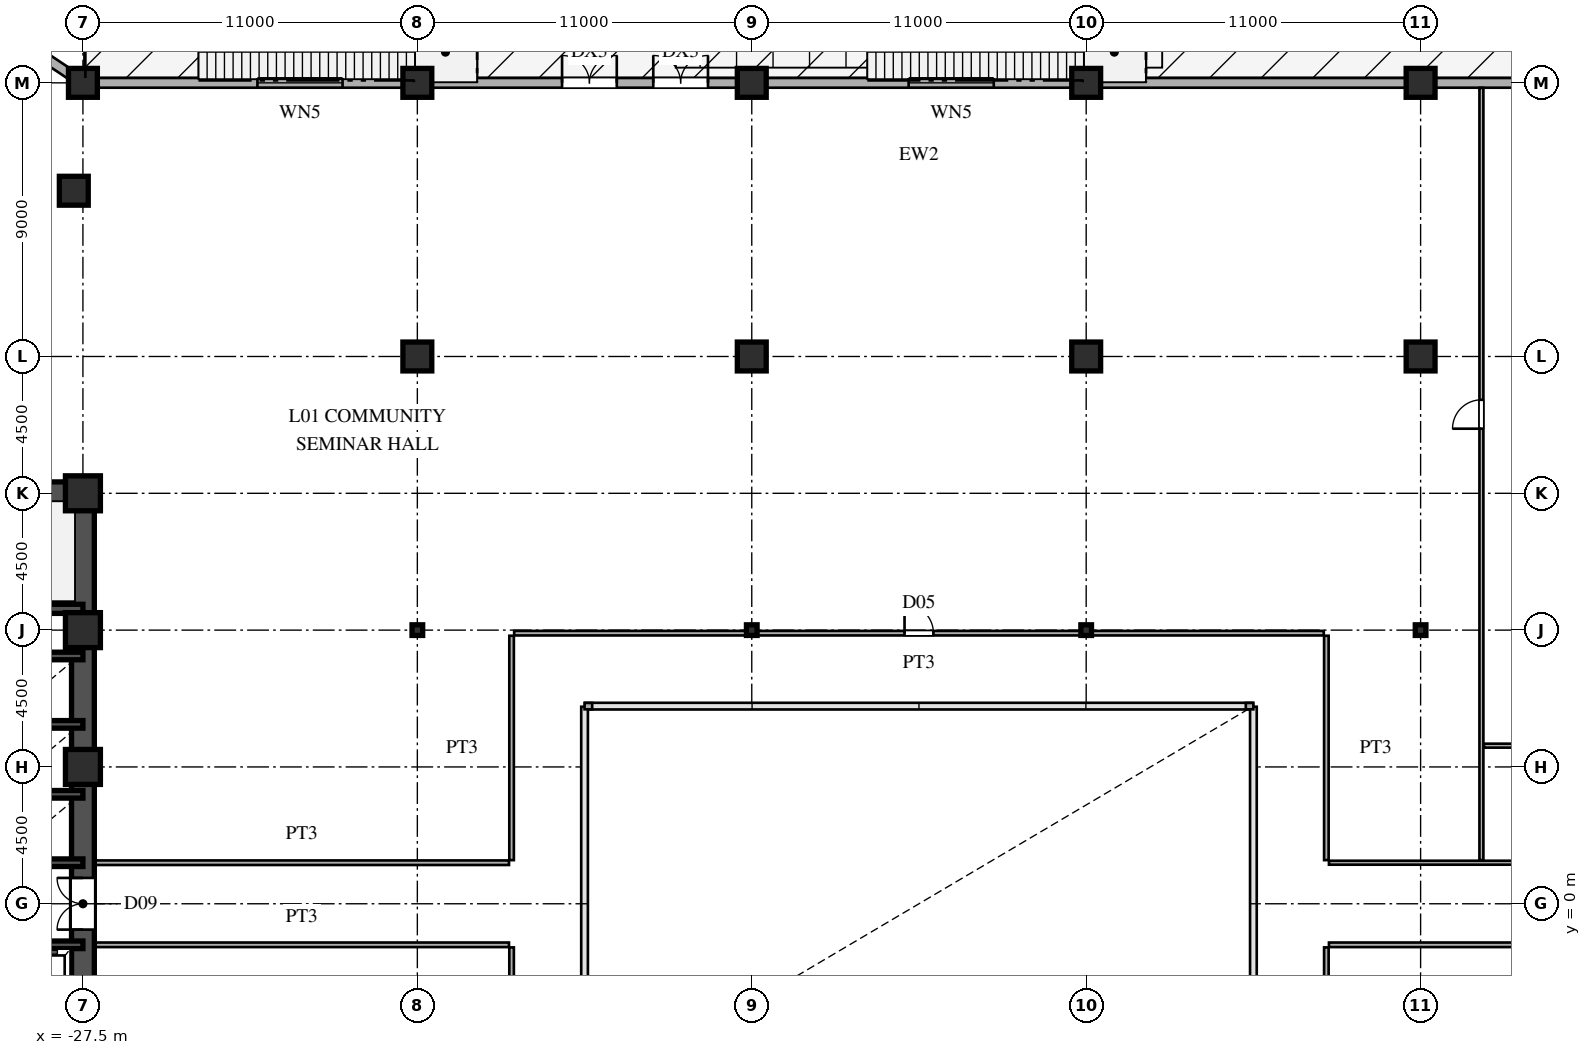
"""IFC4 building model, lengths in metres.
Left out: names, types, materials, properties, quantities, classifications, styles, units other than length and angle.
Written with IfcOpenShell. Run it as: python <this file> out.ifc"""

import sys

from ifc_helpers import new_model, si_unit, direction, frame, frame_2d, origin, origin_2d, place, context, subcontext, project, spatial, rectangle, hollow_rectangle, i_section, extrude, source, transform, mapped, element, fill, save


model = new_model("IFC4")
c1 = context("Model", 3, precision=1e-05, world=origin(), true_north=direction((0.0, 1.0)))
c2 = subcontext(c1, "Body", "Model", "MODEL_VIEW")
j1 = project(units=[si_unit("LENGTHUNIT", "METRE"), si_unit("PLANEANGLEUNIT", "RADIAN")], contexts=[c1])
p1 = place(None, origin())
s1 = spatial("IfcSite", under=j1, at=p1, CompositionType="ELEMENT")
p2 = place(p1, origin())
s2 = spatial("IfcBuilding", under=s1, at=p2, CompositionType="ELEMENT")
p3 = place(p2, frame((0.0, 0.0, 5.4)))
s3 = spatial("IfcBuildingStorey", under=s2, at=p3, CompositionType="ELEMENT", Elevation=5.4)
m1 = source(origin(), c2, "Body", "SweptSolid", [
    extrude(hollow_rectangle(XDim=1.15, YDim=1.15, WallThickness=0.048, at=origin_2d()), origin(), (0.0, 0.0, 1.0), 4.5),
])
for number, where, z_axis, x_axis in (
    (1, (-27.5, 4.5, 0.0), (0.0, 0.0, 1.0), (1.0, 0.0, 0.0)),
    (2, (-27.5, 9.0, 0.0), (0.0, 0.0, 1.0), (1.0, 0.0, 0.0)),
    (3, (-27.5, 13.5, 0.0), (0.0, 0.0, 1.0), (1.0, 0.0, 0.0)),
):
    element("IfcColumn", number, at=place(p3, frame(where, z_axis=z_axis, x_axis=x_axis)), inside=s3, PredefinedType="COLUMN", context=c2, shape_type="MappedRepresentation", body=[
        mapped(m1, transform((0.0, 0.0, 0.0), scale=1.0)),
    ])
m2 = source(origin(), c2, "Body", "SweptSolid", [
    extrude(rectangle(XDim=0.95, YDim=0.95, at=origin_2d()), origin(), (0.0, 0.0, 1.0), 4.5),
])
for number, where, z_axis, x_axis in (
    (4, (-27.5, 27.0, 0.0), (0.0, 0.0, 1.0), (1.0, 0.0, 0.0)),
    (5, (-27.8, 23.451, 0.0), (0.0, 0.0, 1.0), (1.0, 0.0, 0.0)),
):
    element("IfcColumn", number, at=place(p3, frame(where, z_axis=z_axis, x_axis=x_axis)), inside=s3, PredefinedType="COLUMN", context=c2, shape_type="MappedRepresentation", body=[
        mapped(m2, transform((0.0, 0.0, 0.0), scale=1.0)),
    ])
m3 = source(origin(), c2, "Body", "SweptSolid", [
    extrude(i_section(OverallWidth=0.35, OverallDepth=0.35, WebThickness=0.012, FlangeThickness=0.019, at=origin_2d()), origin(), (0.0, 0.0, 1.0), 4.5),
])
p4 = place(p3, frame((-16.5, 9.0, 0.0), z_axis=(0.0, 0.0, 1.0), x_axis=(1.0, 0.0, 0.0)))
e6 = element("IfcColumn", 6, at=p4, inside=s3, PredefinedType="COLUMN", context=c2, shape_type="MappedRepresentation", body=[
    mapped(m3, transform((0.0, 0.0, 0.0), scale=1.0)),
])
for number, where, z_axis, x_axis in (
    (7, (-16.5, 18.0, 0.0), (0.0, 0.0, 1.0), (1.0, 0.0, 0.0)),
    (8, (-16.5, 27.0, 0.0), (0.0, 0.0, 1.0), (1.0, 0.0, 0.0)),
):
    element("IfcColumn", number, at=place(p3, frame(where, z_axis=z_axis, x_axis=x_axis)), inside=s3, PredefinedType="COLUMN", context=c2, shape_type="MappedRepresentation", body=[
        mapped(m2, transform((0.0, 0.0, 0.0), scale=1.0)),
    ])
p5 = place(p3, frame((-5.5, 9.0, 0.0), z_axis=(0.0, 0.0, 1.0), x_axis=(1.0, 0.0, 0.0)))
e9 = element("IfcColumn", 9, at=p5, inside=s3, PredefinedType="COLUMN", context=c2, shape_type="MappedRepresentation", body=[
    mapped(m3, transform((0.0, 0.0, 0.0), scale=1.0)),
])
for number, where, z_axis, x_axis in (
    (10, (-5.5, 18.0, 0.0), (0.0, 0.0, 1.0), (1.0, 0.0, 0.0)),
    (11, (-5.5, 27.0, 0.0), (0.0, 0.0, 1.0), (1.0, 0.0, 0.0)),
):
    element("IfcColumn", number, at=place(p3, frame(where, z_axis=z_axis, x_axis=x_axis)), inside=s3, PredefinedType="COLUMN", context=c2, shape_type="MappedRepresentation", body=[
        mapped(m2, transform((0.0, 0.0, 0.0), scale=1.0)),
    ])
p6 = place(p3, frame((5.5, 9.0, 0.0), z_axis=(0.0, 0.0, 1.0), x_axis=(1.0, 0.0, 0.0)))
e12 = element("IfcColumn", 12, at=p6, inside=s3, PredefinedType="COLUMN", context=c2, shape_type="MappedRepresentation", body=[
    mapped(m3, transform((0.0, 0.0, 0.0), scale=1.0)),
])
for number, where, z_axis, x_axis in (
    (13, (5.5, 18.0, 0.0), (0.0, 0.0, 1.0), (1.0, 0.0, 0.0)),
    (14, (5.5, 27.0, 0.0), (0.0, 0.0, 1.0), (1.0, 0.0, 0.0)),
):
    element("IfcColumn", number, at=place(p3, frame(where, z_axis=z_axis, x_axis=x_axis)), inside=s3, PredefinedType="COLUMN", context=c2, shape_type="MappedRepresentation", body=[
        mapped(m2, transform((0.0, 0.0, 0.0), scale=1.0)),
    ])
p7 = place(p3, frame((16.5, 9.0, 0.0), z_axis=(0.0, 0.0, 1.0), x_axis=(1.0, 0.0, 0.0)))
e15 = element("IfcColumn", 15, at=p7, inside=s3, PredefinedType="COLUMN", context=c2, shape_type="MappedRepresentation", body=[
    mapped(m3, transform((0.0, 0.0, 0.0), scale=1.0)),
])
for number, where, z_axis, x_axis in (
    (16, (16.5, 18.0, 0.0), (0.0, 0.0, 1.0), (1.0, 0.0, 0.0)),
    (17, (16.5, 27.0, 0.0), (0.0, 0.0, 1.0), (1.0, 0.0, 0.0)),
):
    element("IfcColumn", number, at=place(p3, frame(where, z_axis=z_axis, x_axis=x_axis)), inside=s3, PredefinedType="COLUMN", context=c2, shape_type="MappedRepresentation", body=[
        mapped(m2, transform((0.0, 0.0, 0.0), scale=1.0)),
    ])
p8 = place(p3, frame((27.46, 27.0, 0.0), z_axis=(0.0, 0.0, 1.0), x_axis=(-1.0, 0.0, 0.0)))
e18 = element("IfcWall", 18, at=p8, inside=s3, PredefinedType="SOLIDWALL", context=c2, shape_type="SweptSolid", body=[
    extrude(rectangle(XDim=54.92, YDim=0.32, at=frame_2d((27.46, 0.0))), origin(), (0.0, 0.0, 1.0), 3.42),
])
p9 = place(p8, frame((34.4, 0.0, 0.0)))
e19 = element("IfcOpeningElement", 19, at=p9, cuts=e18, PredefinedType="OPENING", context=c2, shape_type="SweptSolid", body=[
    extrude(rectangle(XDim=1.8, YDim=2.3, at=frame_2d((0.9, 1.15))), frame((0.0, 0.17, 0.0), z_axis=(0.0, -1.0, 0.0), x_axis=(1.0, 0.0, 0.0)), (0.0, 0.0, 1.0), 0.34),
])
p10 = place(p8, frame((37.4, 0.0, 0.0)))
e20 = element("IfcOpeningElement", 20, at=p10, cuts=e18, PredefinedType="OPENING", context=c2, shape_type="SweptSolid", body=[
    extrude(rectangle(XDim=1.8, YDim=2.3, at=frame_2d((0.9, 1.15))), frame((0.0, 0.17, 0.0), z_axis=(0.0, -1.0, 0.0), x_axis=(1.0, 0.0, 0.0)), (0.0, 0.0, 1.0), 0.34),
])
p11 = place(p8, frame((4.5, 0.0, 0.8)))
e21 = element("IfcOpeningElement", 21, at=p11, cuts=e18, PredefinedType="OPENING", context=c2, shape_type="SweptSolid", body=[
    extrude(rectangle(XDim=2.8, YDim=2.1, at=frame_2d((1.4, 1.05))), frame((0.0, 0.17, 0.0), z_axis=(0.0, -1.0, 0.0), x_axis=(1.0, 0.0, 0.0)), (0.0, 0.0, 1.0), 0.34),
])
p12 = place(p8, frame((25.0, 0.0, 0.8)))
e22 = element("IfcOpeningElement", 22, at=p12, cuts=e18, PredefinedType="OPENING", context=c2, shape_type="SweptSolid", body=[
    extrude(rectangle(XDim=2.8, YDim=2.1, at=frame_2d((1.4, 1.05))), frame((0.0, 0.17, 0.0), z_axis=(0.0, -1.0, 0.0), x_axis=(1.0, 0.0, 0.0)), (0.0, 0.0, 1.0), 0.34),
])
p13 = place(p8, frame((46.42, 0.0, 0.8)))
e23 = element("IfcOpeningElement", 23, at=p13, cuts=e18, PredefinedType="OPENING", context=c2, shape_type="SweptSolid", body=[
    extrude(rectangle(XDim=2.8, YDim=2.1, at=frame_2d((1.4, 1.05))), frame((0.0, 0.17, 0.0), z_axis=(0.0, -1.0, 0.0), x_axis=(1.0, 0.0, 0.0)), (0.0, 0.0, 1.0), 0.34),
])
p14 = place(p3, frame((-27.533, 27.022, 0.0), z_axis=(0.0, 0.0, 1.0), x_axis=(-0.832071600484, 0.554668235676, 0.0)))
e24 = element("IfcWall", 24, at=p14, inside=s3, PredefinedType="SOLIDWALL", context=c2, shape_type="SweptSolid", body=[
    extrude(rectangle(XDim=3.526, YDim=0.32, at=frame_2d((1.763, 0.0))), origin(), (0.0, 0.0, 1.0), 4.22),
])
for number, where, z_axis, x_axis in (
    (25, (11.0, 6.5, 0.0), (0.0, 0.0, 1.0), (-1.0, 0.0, 0.0)),
    (26, (-11.0, 6.5, 0.0), (0.0, 0.0, 1.0), (1.0, 0.0, 0.0)),
):
    element("IfcWall", number, at=place(p3, frame(where, z_axis=z_axis, x_axis=x_axis)), inside=s3, PredefinedType="SOLIDWALL", context=c2, shape_type="SweptSolid", body=[
        extrude(rectangle(XDim=0.25, YDim=0.21, at=frame_2d((0.125, 0.0))), origin(), (0.0, 0.0, 1.0), 4.22),
    ])
for number, where, z_axis, x_axis in (
    (27, (-27.5, -13.5, 0.0), (0.0, 0.0, 1.0), (0.0, 1.0, 0.0)),
    (28, (-27.5, 1.3, 0.0), (0.0, 0.0, 1.0), (0.0, 1.0, 0.0)),
):
    element("IfcWall", number, at=place(p3, frame(where, z_axis=z_axis, x_axis=x_axis)), inside=s3, PredefinedType="SHEAR", context=c2, shape_type="SweptSolid", body=[
        extrude(rectangle(XDim=12.2, YDim=0.75, at=frame_2d((6.1, 0.0))), origin(), (0.0, 0.0, 1.0), 4.22),
    ])
p15 = place(p3, frame((-27.5, -1.3, 0.0), z_axis=(0.0, 0.0, 1.0), x_axis=(0.0, 1.0, 0.0)))
e29 = element("IfcWall", 29, at=p15, inside=s3, PredefinedType="SHEAR", context=c2, shape_type="SweptSolid", body=[
    extrude(rectangle(XDim=2.6, YDim=0.75, at=frame_2d((1.3, 0.0))), origin(), (0.0, 0.0, 1.0), 4.22),
])
p16 = place(p15, frame((0.45, 0.0, 0.0)))
e30 = element("IfcOpeningElement", 30, at=p16, cuts=e29, PredefinedType="OPENING", context=c2, shape_type="SweptSolid", body=[
    extrude(rectangle(XDim=1.7, YDim=2.35, at=frame_2d((0.85, 1.175))), frame((0.0, 0.385, 0.0), z_axis=(0.0, -1.0, 0.0), x_axis=(1.0, 0.0, 0.0)), (0.0, 0.0, 1.0), 0.77),
])
p17 = place(p3, frame((-36.5, 13.5, 0.0), z_axis=(0.0, 0.0, 1.0), x_axis=(1.0, 0.0, 0.0)))
e31 = element("IfcWall", 31, at=p17, inside=s3, PredefinedType="SHEAR", context=c2, shape_type="SweptSolid", body=[
    extrude(rectangle(XDim=9.0, YDim=0.75, at=frame_2d((4.5, 0.0))), origin(), (0.0, 0.0, 1.0), 4.22),
])
p18 = place(p3, frame((-36.5, 9.7, 0.0), z_axis=(0.0, 0.0, 1.0), x_axis=(1.0, 0.0, 0.0)))
e32 = element("IfcWall", 32, at=p18, inside=s3, PredefinedType="SHEAR", context=c2, shape_type="SweptSolid", body=[
    extrude(rectangle(XDim=9.0, YDim=0.3, at=frame_2d((4.5, 0.0))), origin(), (0.0, 0.0, 1.0), 4.22),
])
p19 = place(p18, frame((0.6, 0.0, 0.0)))
e33 = element("IfcOpeningElement", 33, at=p19, cuts=e32, PredefinedType="OPENING", context=c2, shape_type="SweptSolid", body=[
    extrude(rectangle(XDim=1.1, YDim=2.2, at=frame_2d((0.55, 1.1))), frame((0.0, 0.16, 0.0), z_axis=(0.0, -1.0, 0.0), x_axis=(1.0, 0.0, 0.0)), (0.0, 0.0, 1.0), 0.32),
])
for number, where, z_axis, x_axis in (
    (34, (-30.3, -1.35, 0.0), (0.0, 0.0, 1.0), (1.0, 0.0, 0.0)),
    (35, (-30.3, 1.35, 0.0), (0.0, 0.0, 1.0), (1.0, 0.0, 0.0)),
    (36, (-30.3, 3.6, 0.0), (0.0, 0.0, 1.0), (1.0, 0.0, 0.0)),
    (37, (-30.3, 5.9, 0.0), (0.0, 0.0, 1.0), (1.0, 0.0, 0.0)),
    (38, (-30.3, 8.15, 0.0), (0.0, 0.0, 1.0), (1.0, 0.0, 0.0)),
):
    element("IfcWall", number, at=place(p3, frame(where, z_axis=z_axis, x_axis=x_axis)), inside=s3, PredefinedType="SHEAR", context=c2, shape_type="SweptSolid", body=[
        extrude(rectangle(XDim=2.8, YDim=0.25, at=frame_2d((1.4, 0.0))), origin(), (0.0, 0.0, 1.0), 4.22),
    ])
for number, where, z_axis, x_axis in (
    (39, (-27.12, -1.35, 0.0), (0.0, 0.0, 1.0), (1.0, 0.0, 0.0)),
    (40, (13.485, -1.35, 0.0), (0.0, 0.0, 1.0), (1.0, 0.0, 0.0)),
    (41, (-27.12, 1.35, 0.0), (0.0, 0.0, 1.0), (1.0, 0.0, 0.0)),
):
    element("IfcWall", number, at=place(p3, frame(where, z_axis=z_axis, x_axis=x_axis)), inside=s3, PredefinedType="PARTITIONING", context=c2, shape_type="SweptSolid", body=[
        extrude(rectangle(XDim=13.635, YDim=0.15, at=frame_2d((6.817, 0.0))), origin(), (0.0, 0.0, 1.0), 4.22),
    ])
p20 = place(p3, frame((13.485, 1.35, 0.0), z_axis=(0.0, 0.0, 1.0), x_axis=(1.0, 0.0, 0.0)))
e42 = element("IfcWall", 42, at=p20, inside=s3, PredefinedType="PARTITIONING", context=c2, shape_type="SweptSolid", body=[
    extrude(rectangle(XDim=13.635, YDim=0.13, at=frame_2d((6.817, 0.0))), origin(), (0.0, 0.0, 1.0), 4.22),
])
p21 = place(p20, frame((6.825, 0.0, 0.0)))
e43 = element("IfcOpeningElement", 43, at=p21, cuts=e42, PredefinedType="OPENING", context=c2, shape_type="SweptSolid", body=[
    extrude(rectangle(XDim=0.88, YDim=2.1, at=frame_2d((0.44, 1.05))), frame((0.0, 0.075, 0.0), z_axis=(0.0, -1.0, 0.0), x_axis=(1.0, 0.0, 0.0)), (0.0, 0.0, 1.0), 0.15),
])
p22 = place(p20, frame((11.175, 0.0, 0.0)))
e44 = element("IfcOpeningElement", 44, at=p22, cuts=e42, PredefinedType="OPENING", context=c2, shape_type="SweptSolid", body=[
    extrude(rectangle(XDim=0.88, YDim=2.1, at=frame_2d((0.44, 1.05))), frame((0.0, 0.075, 0.0), z_axis=(0.0, -1.0, 0.0), x_axis=(1.0, 0.0, 0.0)), (0.0, 0.0, 1.0), 0.15),
])
p23 = place(p3, frame((18.585, 5.2, 0.0), z_axis=(0.0, 0.0, 1.0), x_axis=(1.0, 0.0, 0.0)))
e45 = element("IfcWall", 45, at=p23, inside=s3, PredefinedType="PARTITIONING", context=c2, shape_type="SweptSolid", body=[
    extrude(rectangle(XDim=8.535, YDim=0.13, at=frame_2d((4.268, 0.0))), origin(), (0.0, 0.0, 1.0), 4.22),
])
p24 = place(p3, frame((-13.315, 8.9, 0.0), z_axis=(0.0, 0.0, 1.0), x_axis=(1.0, 0.0, 0.0)))
e46 = element("IfcWall", 46, at=p24, inside=s3, PredefinedType="PARTITIONING", context=c2, shape_type="SweptSolid", body=[
    extrude(rectangle(XDim=26.63, YDim=0.15, at=frame_2d((13.315, 0.0))), origin(), (0.0, 0.0, 1.0), 3.42),
])
p25 = place(p24, frame((12.84, 0.0, 0.0)))
e47 = element("IfcOpeningElement", 47, at=p25, cuts=e46, PredefinedType="OPENING", context=c2, shape_type="SweptSolid", body=[
    extrude(rectangle(XDim=0.95, YDim=2.15, at=frame_2d((0.475, 1.075))), frame((0.0, 0.085, 0.0), z_axis=(0.0, -1.0, 0.0), x_axis=(1.0, 0.0, 0.0)), (0.0, 0.0, 1.0), 0.17),
])
for number, where, z_axis, x_axis in (
    (48, (-13.4, -8.815, 0.0), (0.0, 0.0, 1.0), (0.0, 1.0, 0.0)),
    (49, (-13.4, 1.435, 0.0), (0.0, 0.0, 1.0), (0.0, 1.0, 0.0)),
    (50, (13.4, -8.815, 0.0), (0.0, 0.0, 1.0), (0.0, 1.0, 0.0)),
    (51, (13.4, 1.435, 0.0), (0.0, 0.0, 1.0), (0.0, 1.0, 0.0)),
):
    element("IfcWall", number, at=place(p3, frame(where, z_axis=z_axis, x_axis=x_axis)), inside=s3, PredefinedType="PARTITIONING", context=c2, shape_type="SweptSolid", body=[
        extrude(rectangle(XDim=7.38, YDim=0.15, at=frame_2d((3.69, 0.0))), origin(), (0.0, 0.0, 1.0), 4.22),
    ])
p26 = place(p3, frame((18.5, 1.435, 0.0), z_axis=(0.0, 0.0, 1.0), x_axis=(0.0, 1.0, 0.0)))
e52 = element("IfcWall", 52, at=p26, inside=s3, PredefinedType="PARTITIONING", context=c2, shape_type="SweptSolid", body=[
    extrude(rectangle(XDim=25.4, YDim=0.13, at=frame_2d((12.7, 0.0))), origin(), (0.0, 0.0, 1.0), 4.22),
])
p27 = place(p26, frame((14.19, 0.0, 0.0)))
e53 = element("IfcOpeningElement", 53, at=p27, cuts=e52, PredefinedType="OPENING", context=c2, shape_type="SweptSolid", body=[
    extrude(rectangle(XDim=0.95, YDim=2.15, at=frame_2d((0.475, 1.075))), frame((0.0, 0.075, 0.0), z_axis=(0.0, -1.0, 0.0), x_axis=(1.0, 0.0, 0.0)), (0.0, 0.0, 1.0), 0.15),
])
m4 = source(origin(), c2, "Body", "SweptSolid", [
    extrude(rectangle(XDim=1.8, YDim=2.3, at=frame_2d((0.9, 1.15))), frame((0.0, 0.025, 0.0), z_axis=(0.0, -1.0, 0.0), x_axis=(1.0, 0.0, 0.0)), (0.0, 0.0, 1.0), 0.05),
])
p28 = place(p9, frame((1.8, 0.0, 0.0), z_axis=(0.0, 0.0, 1.0), x_axis=(-1.0, 0.0, 0.0)))
e54 = element("IfcDoor", 54, at=p28, inside=s3, OperationType="DOUBLE_SWING_LEFT", PredefinedType="DOOR", context=c2, shape_type="MappedRepresentation", body=[
    mapped(m4, transform((0.0, 0.0, 0.0), scale=1.0)),
])
fill(e19, e54)
p29 = place(p10, frame((1.8, 0.0, 0.0), z_axis=(0.0, 0.0, 1.0), x_axis=(-1.0, 0.0, 0.0)))
e55 = element("IfcDoor", 55, at=p29, inside=s3, OperationType="DOUBLE_SWING_LEFT", PredefinedType="DOOR", context=c2, shape_type="MappedRepresentation", body=[
    mapped(m4, transform((0.0, 0.0, 0.0), scale=1.0)),
])
fill(e20, e55)
m5 = source(origin(), c2, "Body", "SweptSolid", [
    extrude(rectangle(XDim=2.8, YDim=2.1, at=frame_2d((1.4, 1.05))), frame((0.0, 0.03, 0.0), z_axis=(0.0, -1.0, 0.0), x_axis=(1.0, 0.0, 0.0)), (0.0, 0.0, 1.0), 0.06),
])
p30 = place(p12, origin())
e56 = element("IfcWindow", 56, at=p30, inside=s3, PartitioningType="SINGLE_PANEL", PredefinedType="WINDOW", context=c2, shape_type="MappedRepresentation", body=[
    mapped(m5, transform((0.0, 0.0, 0.0), scale=1.0)),
])
fill(e22, e56)
p31 = place(p13, origin())
e57 = element("IfcWindow", 57, at=p31, inside=s3, PartitioningType="SINGLE_PANEL", PredefinedType="WINDOW", context=c2, shape_type="MappedRepresentation", body=[
    mapped(m5, transform((0.0, 0.0, 0.0), scale=1.0)),
])
fill(e23, e57)
m6 = source(origin(), c2, "Body", "SweptSolid", [
    extrude(rectangle(XDim=1.7, YDim=2.35, at=frame_2d((0.85, 1.175))), frame((0.0, 0.025, 0.0), z_axis=(0.0, -1.0, 0.0), x_axis=(1.0, 0.0, 0.0)), (0.0, 0.0, 1.0), 0.05),
])
p32 = place(p16, origin())
e58 = element("IfcDoor", 58, at=p32, inside=s3, OperationType="DOUBLE_SWING_LEFT", PredefinedType="DOOR", context=c2, shape_type="MappedRepresentation", body=[
    mapped(m6, transform((0.0, 0.0, 0.0), scale=1.0)),
])
fill(e30, e58)
m7 = source(origin(), c2, "Body", "SweptSolid", [
    extrude(rectangle(XDim=0.95, YDim=2.15, at=frame_2d((0.475, 1.075))), frame((0.0, 0.025, 0.0), z_axis=(0.0, -1.0, 0.0), x_axis=(1.0, 0.0, 0.0)), (0.0, 0.0, 1.0), 0.05),
])
p33 = place(p25, origin())
e59 = element("IfcDoor", 59, at=p33, inside=s3, OperationType="SINGLE_SWING_LEFT", PredefinedType="DOOR", context=c2, shape_type="MappedRepresentation", body=[
    mapped(m7, transform((0.0, 0.0, 0.0), scale=1.0)),
])
fill(e47, e59)
p34 = place(p27, origin())
e60 = element("IfcDoor", 60, at=p34, inside=s3, OperationType="SINGLE_SWING_LEFT", PredefinedType="DOOR", context=c2, shape_type="MappedRepresentation", body=[
    mapped(m7, transform((0.0, 0.0, 0.0), scale=1.0)),
])
fill(e53, e60)
save(model, sys.argv[1])
